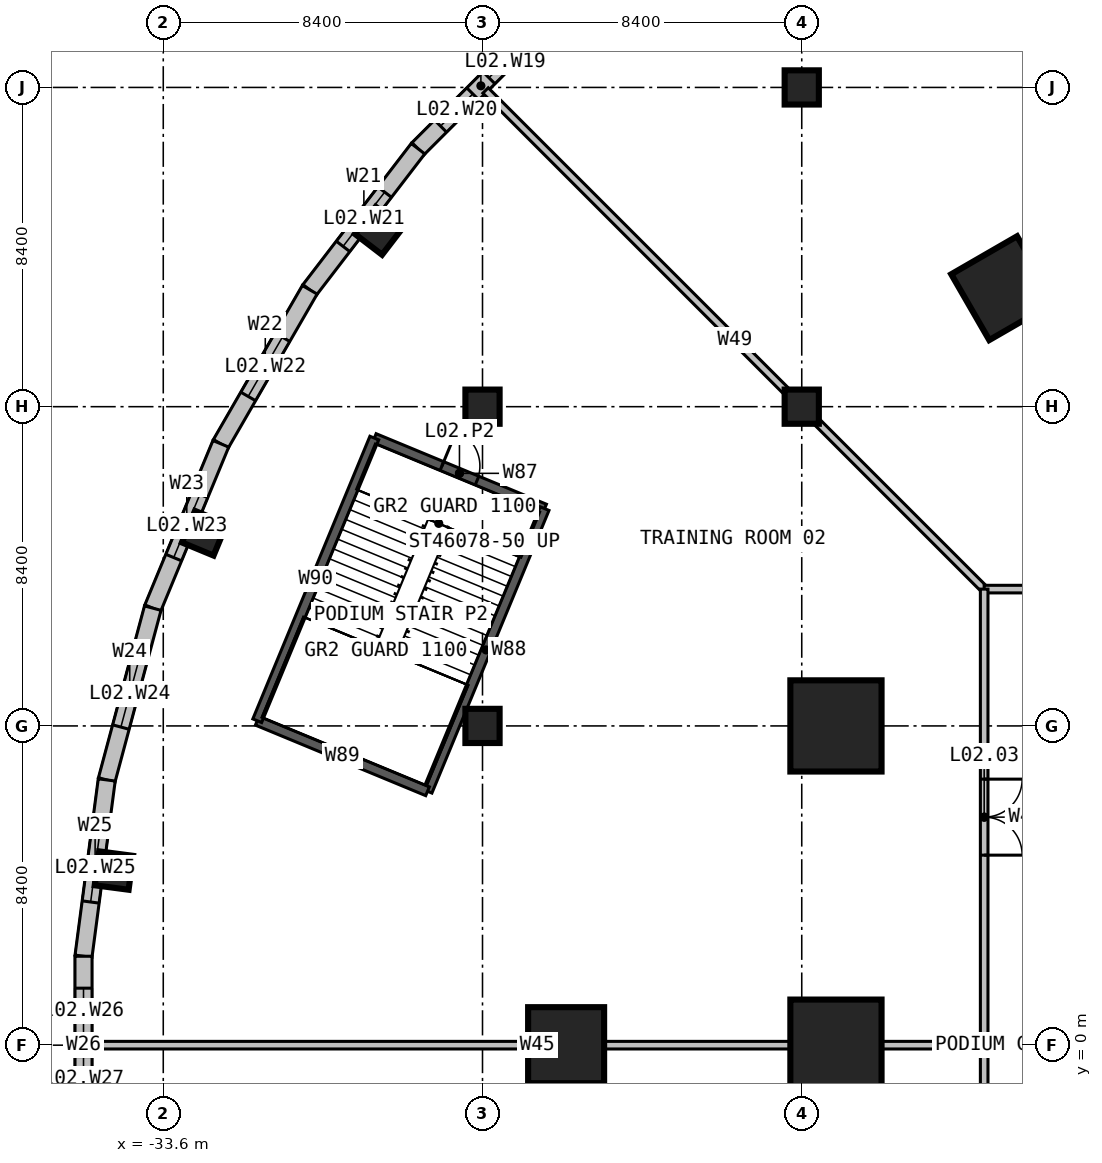
"""IFC4 building model, lengths in metres.
Left out: names, types, materials, properties, quantities, classifications, styles, units other than length and angle.
Written with IfcOpenShell. Run it as: python <this file> out.ifc"""

import sys

from ifc_helpers import new_model, si_unit, direction, frame, frame_2d, origin, origin_2d, place, context, subcontext, project, spatial, rectangle, hollow_rectangle, extrude, element, fill, save


model = new_model("IFC4")
c1 = context("Model", 3, precision=1e-05, world=origin(), true_north=direction((0.0, 1.0)))
c2 = subcontext(c1, "Body", "Model", "MODEL_VIEW")
j1 = project(units=[si_unit("LENGTHUNIT", "METRE"), si_unit("PLANEANGLEUNIT", "RADIAN")], contexts=[c1])
p1 = place(None, origin())
s1 = spatial("IfcSite", under=j1, at=p1, CompositionType="ELEMENT")
p2 = place(p1, origin())
s2 = spatial("IfcBuilding", under=s1, at=p2, CompositionType="ELEMENT")
p3 = place(p2, frame((0.0, 0.0, 11.0)))
s3 = spatial("IfcBuildingStorey", under=s2, at=p3, CompositionType="ELEMENT", Elevation=11.0)
for number, where, z_axis, x_axis in (
    (1, (-25.2, 8.4, 0.0), (0.0, 0.0, 1.0), (1.0, 0.0, 0.0)),
    (2, (-25.2, 16.8, 0.0), (0.0, 0.0, 1.0), (1.0, 0.0, 0.0)),
):
    element("IfcColumn", number, at=place(p3, frame(where, z_axis=z_axis, x_axis=x_axis)), inside=s3, PredefinedType="COLUMN", context=c2, shape_type="SweptSolid", body=[
        extrude(rectangle(XDim=0.9, YDim=0.9, at=origin_2d()), origin(), (0.0, 0.0, 1.0), 5.0),
    ])
for number, where, z_axis, x_axis in (
    (3, (-15.9, 0.0, 0.0), (0.0, 0.0, 1.0), (1.0, 0.0, 0.0)),
    (4, (-15.9, 8.4, 0.0), (0.0, 0.0, 1.0), (1.0, 0.0, 0.0)),
):
    element("IfcColumn", number, at=place(p3, frame(where, z_axis=z_axis, x_axis=x_axis)), inside=s3, PredefinedType="COLUMN", context=c2, shape_type="SweptSolid", body=[
        extrude(rectangle(XDim=2.4, YDim=2.4, at=origin_2d()), origin(), (0.0, 0.0, 1.0), 5.0),
    ])
for number, where, z_axis, x_axis in (
    (5, (-16.8, 16.8, 0.0), (0.0, 0.0, 1.0), (1.0, 0.0, 0.0)),
    (6, (-16.8, 25.2, 0.0), (0.0, 0.0, 1.0), (1.0, 0.0, 0.0)),
    (7, (-27.926, 21.428, 0.0), (0.0, 0.0, 1.0), (-0.793, 0.609, 0.0)),
    (8, (-32.521, 13.47, 0.0), (0.0, 0.0, 1.0), (-0.924, 0.383, 0.0)),
    (9, (-34.899, 4.594, 0.0), (0.0, 0.0, 1.0), (-0.991, 0.131, 0.0)),
):
    element("IfcColumn", number, at=place(p3, frame(where, z_axis=z_axis, x_axis=x_axis)), inside=s3, PredefinedType="COLUMN", context=c2, shape_type="SweptSolid", body=[
        extrude(rectangle(XDim=0.9, YDim=0.9, at=origin_2d()), origin(), (0.0, 0.0, 1.0), 5.0),
    ])
for number, where, z_axis, x_axis in (
    (10, (-11.5, 19.919, 0.0), (0.0, 0.0, 1.0), (-0.5, 0.866, 0.0)),
    (11, (-23.0, 0.0, 0.0), (0.0, 0.0, 1.0), (-1.0, 0.0, 0.0)),
):
    element("IfcColumn", number, at=place(p3, frame(where, z_axis=z_axis, x_axis=x_axis)), inside=s3, PredefinedType="COLUMN", context=c2, shape_type="SweptSolid", body=[
        extrude(hollow_rectangle(XDim=2.0, YDim=2.0, WallThickness=0.24, at=origin_2d()), origin(), (0.0, 0.0, 1.0), 5.0),
    ])
p4 = place(p3, frame((-23.588, 26.897, 0.0), z_axis=(0.0, 0.0, 1.0), x_axis=(-0.707106781187, -0.707106781187, 0.0)))
e12 = element("IfcWall", 12, at=p4, inside=s3, PredefinedType="SOLIDWALL", context=c2, shape_type="SweptSolid", body=[
    extrude(rectangle(XDim=4.679, YDim=0.45, at=frame_2d((2.34, 0.0))), origin(), (0.0, 0.0, 1.0), 4.7),
])
p5 = place(p4, frame((0.84, 0.0, 0.9)))
e13 = element("IfcOpeningElement", 13, at=p5, cuts=e12, PredefinedType="OPENING", context=c2, shape_type="SweptSolid", body=[
    extrude(rectangle(XDim=1.2, YDim=2.4, at=frame_2d((0.6, 1.2))), frame((0.0, 0.235, 0.0), z_axis=(0.0, -1.0, 0.0), x_axis=(1.0, 0.0, 0.0)), (0.0, 0.0, 1.0), 0.47),
])
p6 = place(p4, frame((2.64, 0.0, 0.9)))
e14 = element("IfcOpeningElement", 14, at=p6, cuts=e12, PredefinedType="OPENING", context=c2, shape_type="SweptSolid", body=[
    extrude(rectangle(XDim=1.2, YDim=2.4, at=frame_2d((0.6, 1.2))), frame((0.0, 0.235, 0.0), z_axis=(0.0, -1.0, 0.0), x_axis=(1.0, 0.0, 0.0)), (0.0, 0.0, 1.0), 0.47),
])
p7 = place(p3, frame((-26.897, 23.588, 0.0), z_axis=(0.0, 0.0, 1.0), x_axis=(-0.608769916927, -0.79334682721, 0.0)))
e15 = element("IfcWall", 15, at=p7, inside=s3, PredefinedType="SOLIDWALL", context=c2, shape_type="SweptSolid", body=[
    extrude(rectangle(XDim=4.68, YDim=0.45, at=frame_2d((2.34, 0.0))), origin(), (0.0, 0.0, 1.0), 4.7),
])
p8 = place(p7, frame((1.44, 0.0, 0.9)))
e16 = element("IfcOpeningElement", 16, at=p8, cuts=e15, PredefinedType="OPENING", context=c2, shape_type="SweptSolid", body=[
    extrude(rectangle(XDim=1.8, YDim=2.4, at=frame_2d((0.9, 1.2))), frame((0.0, 0.235, 0.0), z_axis=(0.0, -1.0, 0.0), x_axis=(1.0, 0.0, 0.0)), (0.0, 0.0, 1.0), 0.47),
])
p9 = place(p3, frame((-29.746, 19.875, 0.0), z_axis=(0.0, 0.0, 1.0), x_axis=(-0.500022025083, -0.866012687223, 0.0)))
e17 = element("IfcWall", 17, at=p9, inside=s3, PredefinedType="SOLIDWALL", context=c2, shape_type="SweptSolid", body=[
    extrude(rectangle(XDim=4.679, YDim=0.45, at=frame_2d((2.34, 0.0))), origin(), (0.0, 0.0, 1.0), 4.7),
])
p10 = place(p9, frame((1.44, 0.0, 0.9)))
e18 = element("IfcOpeningElement", 18, at=p10, cuts=e17, PredefinedType="OPENING", context=c2, shape_type="SweptSolid", body=[
    extrude(rectangle(XDim=1.8, YDim=2.4, at=frame_2d((0.9, 1.2))), frame((0.0, 0.235, 0.0), z_axis=(0.0, -1.0, 0.0), x_axis=(1.0, 0.0, 0.0)), (0.0, 0.0, 1.0), 0.47),
])
p11 = place(p3, frame((-32.086, 15.823, 0.0), z_axis=(0.0, 0.0, 1.0), x_axis=(-0.382669718086, -0.923885213032, 0.0)))
e19 = element("IfcWall", 19, at=p11, inside=s3, PredefinedType="SOLIDWALL", context=c2, shape_type="SweptSolid", body=[
    extrude(rectangle(XDim=4.68, YDim=0.45, at=frame_2d((2.34, 0.0))), origin(), (0.0, 0.0, 1.0), 4.7),
])
p12 = place(p11, frame((1.44, 0.0, 0.9)))
e20 = element("IfcOpeningElement", 20, at=p12, cuts=e19, PredefinedType="OPENING", context=c2, shape_type="SweptSolid", body=[
    extrude(rectangle(XDim=1.8, YDim=2.4, at=frame_2d((0.9, 1.2))), frame((0.0, 0.235, 0.0), z_axis=(0.0, -1.0, 0.0), x_axis=(1.0, 0.0, 0.0)), (0.0, 0.0, 1.0), 0.47),
])
p13 = place(p3, frame((-33.876, 11.5, 0.0), z_axis=(0.0, 0.0, 1.0), x_axis=(-0.258815185258, -0.965926860523, 0.0)))
e21 = element("IfcWall", 21, at=p13, inside=s3, PredefinedType="SOLIDWALL", context=c2, shape_type="SweptSolid", body=[
    extrude(rectangle(XDim=4.68, YDim=0.45, at=frame_2d((2.34, 0.0))), origin(), (0.0, 0.0, 1.0), 4.7),
])
p14 = place(p13, frame((1.44, 0.0, 0.9)))
e22 = element("IfcOpeningElement", 22, at=p14, cuts=e21, PredefinedType="OPENING", context=c2, shape_type="SweptSolid", body=[
    extrude(rectangle(XDim=1.8, YDim=2.4, at=frame_2d((0.9, 1.2))), frame((0.0, 0.235, 0.0), z_axis=(0.0, -1.0, 0.0), x_axis=(1.0, 0.0, 0.0)), (0.0, 0.0, 1.0), 0.47),
])
p15 = place(p3, frame((-35.088, 6.979, 0.0), z_axis=(0.0, 0.0, 1.0), x_axis=(-0.130536838198, -0.991443459746, 0.0)))
e23 = element("IfcWall", 23, at=p15, inside=s3, PredefinedType="SOLIDWALL", context=c2, shape_type="SweptSolid", body=[
    extrude(rectangle(XDim=4.679, YDim=0.45, at=frame_2d((2.34, 0.0))), origin(), (0.0, 0.0, 1.0), 4.7),
])
p16 = place(p15, frame((1.44, 0.0, 0.9)))
e24 = element("IfcOpeningElement", 24, at=p16, cuts=e23, PredefinedType="OPENING", context=c2, shape_type="SweptSolid", body=[
    extrude(rectangle(XDim=1.8, YDim=2.4, at=frame_2d((0.9, 1.2))), frame((0.0, 0.235, 0.0), z_axis=(0.0, -1.0, 0.0), x_axis=(1.0, 0.0, 0.0)), (0.0, 0.0, 1.0), 0.47),
])
p17 = place(p3, frame((-35.698, 2.34, 0.0), z_axis=(0.0, 0.0, 1.0), x_axis=(0.0, -1.0, 0.0)))
e25 = element("IfcWall", 25, at=p17, inside=s3, PredefinedType="SOLIDWALL", context=c2, shape_type="SweptSolid", body=[
    extrude(rectangle(XDim=4.68, YDim=0.45, at=frame_2d((2.34, 0.0))), origin(), (0.0, 0.0, 1.0), 4.7),
])
p18 = place(p17, frame((0.84, 0.0, 0.9)))
e26 = element("IfcOpeningElement", 26, at=p18, cuts=e25, PredefinedType="OPENING", context=c2, shape_type="SweptSolid", body=[
    extrude(rectangle(XDim=1.2, YDim=2.4, at=frame_2d((0.6, 1.2))), frame((0.0, 0.235, 0.0), z_axis=(0.0, -1.0, 0.0), x_axis=(1.0, 0.0, 0.0)), (0.0, 0.0, 1.0), 0.47),
])
p19 = place(p17, frame((2.64, 0.0, 0.9)))
e27 = element("IfcOpeningElement", 27, at=p19, cuts=e25, PredefinedType="OPENING", context=c2, shape_type="SweptSolid", body=[
    extrude(rectangle(XDim=1.2, YDim=2.4, at=frame_2d((0.6, 1.2))), frame((0.0, 0.235, 0.0), z_axis=(0.0, -1.0, 0.0), x_axis=(1.0, 0.0, 0.0)), (0.0, 0.0, 1.0), 0.47),
])
p20 = place(p3, frame((-28.047, 15.974, 0.0), z_axis=(0.0, 0.0, 1.0), x_axis=(0.923862828997, -0.382723755727, 0.0)))
e28 = element("IfcWall", 28, at=p20, inside=s3, PredefinedType="SOLIDWALL", context=c2, shape_type="SweptSolid", body=[
    extrude(rectangle(XDim=4.85, YDim=0.25, at=frame_2d((2.425, 0.0))), origin(), (0.0, 0.0, 1.0), 5.0),
])
p21 = place(p20, frame((1.925, 0.0, 0.0)))
e29 = element("IfcOpeningElement", 29, at=p21, cuts=e28, PredefinedType="OPENING", context=c2, shape_type="SweptSolid", body=[
    extrude(rectangle(XDim=1.0, YDim=2.2, at=frame_2d((0.5, 1.1))), frame((0.0, 0.135, 0.0), z_axis=(0.0, -1.0, 0.0), x_axis=(1.0, 0.0, 0.0)), (0.0, 0.0, 1.0), 0.27),
])
p22 = place(p3, frame((-23.566, 14.118, 0.0), z_axis=(0.0, 0.0, 1.0), x_axis=(-0.382689294869, -0.923877104161, 0.0)))
e30 = element("IfcWall", 30, at=p22, inside=s3, PredefinedType="SOLIDWALL", context=c2, shape_type="SweptSolid", body=[
    extrude(rectangle(XDim=8.05, YDim=0.25, at=frame_2d((4.025, 0.0))), origin(), (0.0, 0.0, 1.0), 5.0),
])
p23 = place(p3, frame((-26.647, 6.681, 0.0), z_axis=(0.0, 0.0, 1.0), x_axis=(-0.923880627248, 0.382680789426, 0.0)))
e31 = element("IfcWall", 31, at=p23, inside=s3, PredefinedType="SOLIDWALL", context=c2, shape_type="SweptSolid", body=[
    extrude(rectangle(XDim=4.85, YDim=0.25, at=frame_2d((2.425, 0.0))), origin(), (0.0, 0.0, 1.0), 5.0),
])
p24 = place(p3, frame((-31.127, 8.537, 0.0), z_axis=(0.0, 0.0, 1.0), x_axis=(0.382678572144, 0.923881545666, 0.0)))
e32 = element("IfcWall", 32, at=p24, inside=s3, PredefinedType="SOLIDWALL", context=c2, shape_type="SweptSolid", body=[
    extrude(rectangle(XDim=8.05, YDim=0.25, at=frame_2d((4.025, 0.0))), origin(), (0.0, 0.0, 1.0), 5.0),
])
p25 = place(p3, frame((-35.52, 0.0, 0.0), z_axis=(0.0, 0.0, 1.0), x_axis=(1.0, 0.0, 0.0)))
e33 = element("IfcWall", 33, at=p25, inside=s3, PredefinedType="PARTITIONING", context=c2, shape_type="SweptSolid", body=[
    extrude(rectangle(XDim=23.52, YDim=0.2, at=frame_2d((11.76, 0.0))), origin(), (0.0, 0.0, 1.0), 4.7),
])
p26 = place(p3, frame((-25.12, 25.12, 0.0), z_axis=(0.0, 0.0, 1.0), x_axis=(0.707106781187, -0.707106781187, 0.0)))
e34 = element("IfcWall", 34, at=p26, inside=s3, PredefinedType="PARTITIONING", context=c2, shape_type="SweptSolid", body=[
    extrude(rectangle(XDim=18.555, YDim=0.2, at=frame_2d((9.277, 0.0))), origin(), (0.0, 0.0, 1.0), 4.7),
])
p27 = place(p3, frame((12.0, 12.0, 0.0), z_axis=(0.0, 0.0, 1.0), x_axis=(-1.0, 0.0, 0.0)))
e35 = element("IfcWall", 35, at=p27, inside=s3, PredefinedType="PARTITIONING", context=c2, shape_type="SweptSolid", body=[
    extrude(rectangle(XDim=24.0, YDim=0.2, at=frame_2d((12.0, 0.0))), origin(), (0.0, 0.0, 1.0), 4.7),
])
p28 = place(p27, frame((11.5, 0.0, 0.0)))
e36 = element("IfcOpeningElement", 36, at=p28, cuts=e35, PredefinedType="OPENING", context=c2, shape_type="SweptSolid", body=[
    extrude(rectangle(XDim=1.0, YDim=2.2, at=frame_2d((0.5, 1.1))), frame((0.0, 0.11, 0.0), z_axis=(0.0, -1.0, 0.0), x_axis=(1.0, 0.0, 0.0)), (0.0, 0.0, 1.0), 0.22),
])
p29 = place(p3, frame((-12.0, 12.0, 0.0), z_axis=(0.0, 0.0, 1.0), x_axis=(0.0, -1.0, 0.0)))
e37 = element("IfcWall", 37, at=p29, inside=s3, PredefinedType="PARTITIONING", context=c2, shape_type="SweptSolid", body=[
    extrude(rectangle(XDim=12.0, YDim=0.2, at=frame_2d((6.0, 0.0))), origin(), (0.0, 0.0, 1.0), 4.7),
])
p30 = place(p29, frame((5.0, 0.0, 0.0)))
e38 = element("IfcOpeningElement", 38, at=p30, cuts=e37, PredefinedType="OPENING", context=c2, shape_type="SweptSolid", body=[
    extrude(rectangle(XDim=2.0, YDim=2.4, at=frame_2d((1.0, 1.2))), frame((0.0, 0.11, 0.0), z_axis=(0.0, -1.0, 0.0), x_axis=(1.0, 0.0, 0.0)), (0.0, 0.0, 1.0), 0.22),
])
p31 = place(p3, frame((-12.0, 0.0, 0.0), z_axis=(0.0, 0.0, 1.0), x_axis=(0.0, -1.0, 0.0)))
e39 = element("IfcWall", 39, at=p31, inside=s3, PredefinedType="PARTITIONING", context=c2, shape_type="SweptSolid", body=[
    extrude(rectangle(XDim=12.0, YDim=0.2, at=frame_2d((6.0, 0.0))), origin(), (0.0, 0.0, 1.0), 4.7),
])
p32 = place(p5, origin())
e40 = element("IfcWindow", 40, at=p32, inside=s3, PartitioningType="SINGLE_PANEL", PredefinedType="WINDOW", context=c2, shape_type="SweptSolid", body=[
    extrude(rectangle(XDim=1.2, YDim=2.4, at=frame_2d((0.6, 1.2))), frame((0.0, 0.03, 0.0), z_axis=(0.0, -1.0, 0.0), x_axis=(1.0, 0.0, 0.0)), (0.0, 0.0, 1.0), 0.06),
])
fill(e13, e40)
p33 = place(p6, origin())
e41 = element("IfcWindow", 41, at=p33, inside=s3, PartitioningType="SINGLE_PANEL", PredefinedType="WINDOW", context=c2, shape_type="SweptSolid", body=[
    extrude(rectangle(XDim=1.2, YDim=2.4, at=frame_2d((0.6, 1.2))), frame((0.0, 0.03, 0.0), z_axis=(0.0, -1.0, 0.0), x_axis=(1.0, 0.0, 0.0)), (0.0, 0.0, 1.0), 0.06),
])
fill(e14, e41)
p34 = place(p8, origin())
e42 = element("IfcWindow", 42, at=p34, inside=s3, PartitioningType="SINGLE_PANEL", PredefinedType="WINDOW", context=c2, shape_type="SweptSolid", body=[
    extrude(rectangle(XDim=1.8, YDim=2.4, at=frame_2d((0.9, 1.2))), frame((0.0, 0.03, 0.0), z_axis=(0.0, -1.0, 0.0), x_axis=(1.0, 0.0, 0.0)), (0.0, 0.0, 1.0), 0.06),
])
fill(e16, e42)
p35 = place(p10, origin())
e43 = element("IfcWindow", 43, at=p35, inside=s3, PartitioningType="SINGLE_PANEL", PredefinedType="WINDOW", context=c2, shape_type="SweptSolid", body=[
    extrude(rectangle(XDim=1.8, YDim=2.4, at=frame_2d((0.9, 1.2))), frame((0.0, 0.03, 0.0), z_axis=(0.0, -1.0, 0.0), x_axis=(1.0, 0.0, 0.0)), (0.0, 0.0, 1.0), 0.06),
])
fill(e18, e43)
p36 = place(p12, origin())
e44 = element("IfcWindow", 44, at=p36, inside=s3, PartitioningType="SINGLE_PANEL", PredefinedType="WINDOW", context=c2, shape_type="SweptSolid", body=[
    extrude(rectangle(XDim=1.8, YDim=2.4, at=frame_2d((0.9, 1.2))), frame((0.0, 0.03, 0.0), z_axis=(0.0, -1.0, 0.0), x_axis=(1.0, 0.0, 0.0)), (0.0, 0.0, 1.0), 0.06),
])
fill(e20, e44)
p37 = place(p14, origin())
e45 = element("IfcWindow", 45, at=p37, inside=s3, PartitioningType="SINGLE_PANEL", PredefinedType="WINDOW", context=c2, shape_type="SweptSolid", body=[
    extrude(rectangle(XDim=1.8, YDim=2.4, at=frame_2d((0.9, 1.2))), frame((0.0, 0.03, 0.0), z_axis=(0.0, -1.0, 0.0), x_axis=(1.0, 0.0, 0.0)), (0.0, 0.0, 1.0), 0.06),
])
fill(e22, e45)
p38 = place(p16, origin())
e46 = element("IfcWindow", 46, at=p38, inside=s3, PartitioningType="SINGLE_PANEL", PredefinedType="WINDOW", context=c2, shape_type="SweptSolid", body=[
    extrude(rectangle(XDim=1.8, YDim=2.4, at=frame_2d((0.9, 1.2))), frame((0.0, 0.03, 0.0), z_axis=(0.0, -1.0, 0.0), x_axis=(1.0, 0.0, 0.0)), (0.0, 0.0, 1.0), 0.06),
])
fill(e24, e46)
p39 = place(p18, origin())
e47 = element("IfcWindow", 47, at=p39, inside=s3, PartitioningType="SINGLE_PANEL", PredefinedType="WINDOW", context=c2, shape_type="SweptSolid", body=[
    extrude(rectangle(XDim=1.2, YDim=2.4, at=frame_2d((0.6, 1.2))), frame((0.0, 0.03, 0.0), z_axis=(0.0, -1.0, 0.0), x_axis=(1.0, 0.0, 0.0)), (0.0, 0.0, 1.0), 0.06),
])
fill(e26, e47)
p40 = place(p19, origin())
e48 = element("IfcWindow", 48, at=p40, inside=s3, PartitioningType="SINGLE_PANEL", PredefinedType="WINDOW", context=c2, shape_type="SweptSolid", body=[
    extrude(rectangle(XDim=1.2, YDim=2.4, at=frame_2d((0.6, 1.2))), frame((0.0, 0.03, 0.0), z_axis=(0.0, -1.0, 0.0), x_axis=(1.0, 0.0, 0.0)), (0.0, 0.0, 1.0), 0.06),
])
fill(e27, e48)
p41 = place(p21, origin())
e49 = element("IfcDoor", 49, at=p41, inside=s3, OperationType="SINGLE_SWING_LEFT", PredefinedType="DOOR", context=c2, shape_type="SweptSolid", body=[
    extrude(rectangle(XDim=1.0, YDim=2.2, at=frame_2d((0.5, 1.1))), frame((0.0, 0.025, 0.0), z_axis=(0.0, -1.0, 0.0), x_axis=(1.0, 0.0, 0.0)), (0.0, 0.0, 1.0), 0.05),
])
fill(e29, e49)
p42 = place(p30, origin())
e50 = element("IfcDoor", 50, at=p42, inside=s3, OperationType="DOUBLE_DOOR_SINGLE_SWING", PredefinedType="DOOR", context=c2, shape_type="SweptSolid", body=[
    extrude(rectangle(XDim=2.0, YDim=2.4, at=frame_2d((1.0, 1.2))), frame((0.0, 0.025, 0.0), z_axis=(0.0, -1.0, 0.0), x_axis=(1.0, 0.0, 0.0)), (0.0, 0.0, 1.0), 0.05),
])
fill(e38, e50)
save(model, sys.argv[1])
